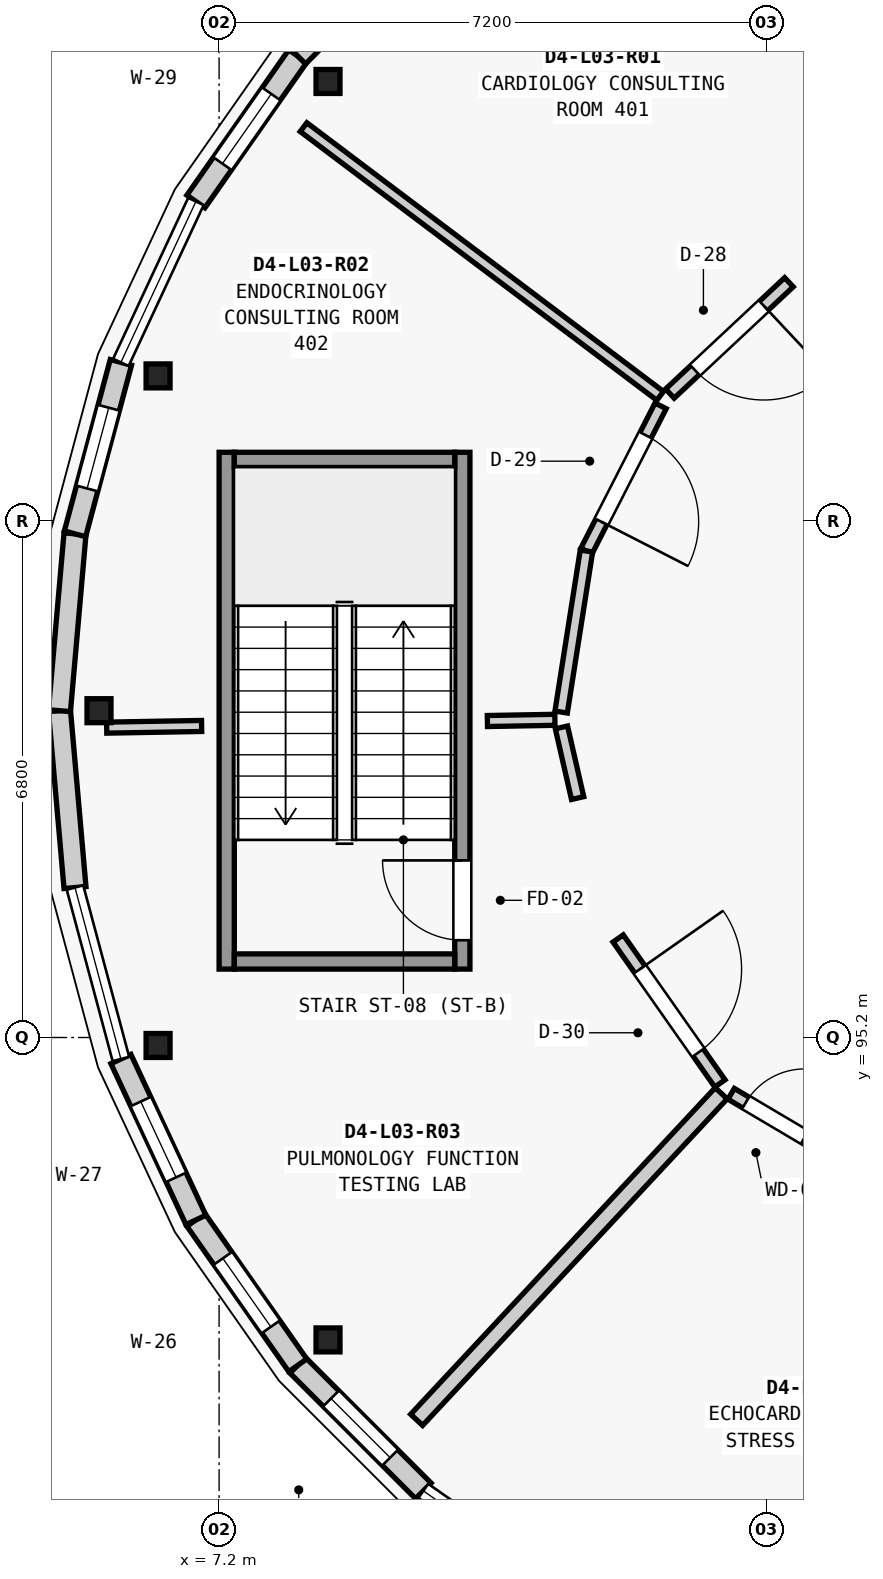
"""IFC4 building model, lengths in metres.
Left out: names, types, materials, properties, quantities, classifications, styles, units other than length and angle.
Written with IfcOpenShell. Run it as: python <this file> out.ifc"""

import sys

from ifc_helpers import new_model, si_unit, direction, frame, frame_2d, origin, origin_2d, place, context, subcontext, project, spatial, rectangle, extrude, element, fill, save


model = new_model("IFC4")
c1 = context("Model", 3, precision=1e-05, world=origin(), true_north=direction((0.0, 1.0)))
c2 = subcontext(c1, "Body", "Model", "MODEL_VIEW")
j1 = project(units=[si_unit("LENGTHUNIT", "METRE"), si_unit("PLANEANGLEUNIT", "RADIAN")], contexts=[c1])
p1 = place(None, origin())
s1 = spatial("IfcSite", under=j1, at=p1, CompositionType="ELEMENT")
p2 = place(p1, origin())
s2 = spatial("IfcBuilding", under=s1, at=p2, CompositionType="ELEMENT")
p3 = place(p2, frame((0.0, 0.0, 12.95)))
s3 = spatial("IfcBuildingStorey", under=s2, at=p3, CompositionType="ELEMENT", Elevation=12.95)
for number, where, z_axis, x_axis in (
    (1, (8.633, 107.779, 0.0), (0.0, 0.0, 1.0), (1.0, 0.0, 0.0)),
    (2, (6.397, 103.905, 0.0), (0.0, 0.0, 1.0), (1.0, 0.0, 0.0)),
    (3, (5.62, 99.5, 0.0), (0.0, 0.0, 1.0), (1.0, 0.0, 0.0)),
    (4, (6.397, 95.095, 0.0), (0.0, 0.0, 1.0), (1.0, 0.0, 0.0)),
    (5, (8.633, 91.221, 0.0), (0.0, 0.0, 1.0), (1.0, 0.0, 0.0)),
):
    element("IfcColumn", number, at=place(p3, frame(where, z_axis=z_axis, x_axis=x_axis)), inside=s3, PredefinedType="COLUMN", context=c2, shape_type="SweptSolid", body=[
        extrude(rectangle(XDim=0.315, YDim=0.315, at=origin_2d()), origin(), (0.0, 0.0, 1.0), 4.2),
    ])
p4 = place(p3, frame((9.887, 89.235, 0.0), z_axis=(0.0, 0.0, 1.0), x_axis=(-0.707106781187, 0.707106781187, 0.0)))
e6 = element("IfcWall", 6, at=p4, inside=s3, PredefinedType="ELEMENTEDWALL", context=c2, shape_type="SweptSolid", body=[
    extrude(rectangle(XDim=2.336, YDim=0.29, at=frame_2d((1.168, 0.0))), origin(), (0.0, 0.0, 1.0), 3.349),
])
p5 = place(p4, frame((0.618, 0.0, 0.85)))
e7 = element("IfcOpeningElement", 7, at=p5, cuts=e6, PredefinedType="OPENING", context=c2, shape_type="SweptSolid", body=[
    extrude(rectangle(XDim=1.1, YDim=1.25, at=frame_2d((0.55, 0.625))), frame((0.0, 0.155, 0.0), z_axis=(0.0, -1.0, 0.0), x_axis=(1.0, 0.0, 0.0)), (0.0, 0.0, 1.0), 0.31),
])
p6 = place(p3, frame((8.235, 90.887, 0.0), z_axis=(0.0, 0.0, 1.0), x_axis=(-0.573728883722, 0.819045278347, 0.0)))
e8 = element("IfcWall", 8, at=p6, inside=s3, PredefinedType="ELEMENTEDWALL", context=c2, shape_type="SweptSolid", body=[
    extrude(rectangle(XDim=2.336, YDim=0.29, at=frame_2d((1.168, 0.0))), origin(), (0.0, 0.0, 1.0), 3.349),
])
p7 = place(p6, frame((0.618, 0.0, 0.85)))
e9 = element("IfcOpeningElement", 9, at=p7, cuts=e8, PredefinedType="OPENING", context=c2, shape_type="SweptSolid", body=[
    extrude(rectangle(XDim=1.1, YDim=1.5, at=frame_2d((0.55, 0.75))), frame((0.0, 0.155, 0.0), z_axis=(0.0, -1.0, 0.0), x_axis=(1.0, 0.0, 0.0)), (0.0, 0.0, 1.0), 0.31),
])
p8 = place(p3, frame((6.895, 92.8, 0.0), z_axis=(0.0, 0.0, 1.0), x_axis=(-0.422587894318, 0.906321946979, 0.0)))
e10 = element("IfcWall", 10, at=p8, inside=s3, PredefinedType="ELEMENTEDWALL", context=c2, shape_type="SweptSolid", body=[
    extrude(rectangle(XDim=2.336, YDim=0.29, at=frame_2d((1.168, 0.0))), origin(), (0.0, 0.0, 1.0), 3.349),
])
p9 = place(p8, frame((0.618, 0.0, 0.85)))
e11 = element("IfcOpeningElement", 11, at=p9, cuts=e10, PredefinedType="OPENING", context=c2, shape_type="SweptSolid", body=[
    extrude(rectangle(XDim=1.1, YDim=1.85, at=frame_2d((0.55, 0.925))), frame((0.0, 0.155, 0.0), z_axis=(0.0, -1.0, 0.0), x_axis=(1.0, 0.0, 0.0)), (0.0, 0.0, 1.0), 0.31),
])
for number, where, z_axis, x_axis in (
    (12, (5.304, 97.173, 0.0), (0.0, 0.0, 1.0), (-0.087, 0.996, 0.0)),
    (13, (5.1, 99.5, 0.0), (0.0, 0.0, 1.0), (0.087, 0.996, 0.0)),
):
    element("IfcWall", number, at=place(p3, frame(where, z_axis=z_axis, x_axis=x_axis)), inside=s3, PredefinedType="ELEMENTEDWALL", context=c2, shape_type="SweptSolid", body=[
        extrude(rectangle(XDim=2.336, YDim=0.29, at=frame_2d((1.168, 0.0))), origin(), (0.0, 0.0, 1.0), 3.349),
    ])
p10 = place(p3, frame((5.304, 101.827, 0.0), z_axis=(0.0, 0.0, 1.0), x_axis=(0.258612423585, 0.965981166673, 0.0)))
e14 = element("IfcWall", 14, at=p10, inside=s3, PredefinedType="ELEMENTEDWALL", context=c2, shape_type="SweptSolid", body=[
    extrude(rectangle(XDim=2.335, YDim=0.29, at=frame_2d((1.168, 0.0))), origin(), (0.0, 0.0, 1.0), 3.349),
])
p11 = place(p10, frame((0.618, 0.0, 0.85)))
e15 = element("IfcOpeningElement", 15, at=p11, cuts=e14, PredefinedType="OPENING", context=c2, shape_type="SweptSolid", body=[
    extrude(rectangle(XDim=1.1, YDim=2.1, at=frame_2d((0.55, 1.05))), frame((0.0, 0.155, 0.0), z_axis=(0.0, -1.0, 0.0), x_axis=(1.0, 0.0, 0.0)), (0.0, 0.0, 1.0), 0.31),
])
p12 = place(p3, frame((6.895, 106.2, 0.0), z_axis=(0.0, 0.0, 1.0), x_axis=(0.573728883722, 0.819045278347, 0.0)))
e16 = element("IfcWall", 16, at=p12, inside=s3, PredefinedType="ELEMENTEDWALL", context=c2, shape_type="SweptSolid", body=[
    extrude(rectangle(XDim=2.336, YDim=0.29, at=frame_2d((1.168, 0.0))), origin(), (0.0, 0.0, 1.0), 3.349),
])
p13 = place(p12, frame((0.608, 0.0, 0.85)))
e17 = element("IfcOpeningElement", 17, at=p13, cuts=e16, PredefinedType="OPENING", context=c2, shape_type="SweptSolid", body=[
    extrude(rectangle(XDim=1.12, YDim=1.65, at=frame_2d((0.56, 0.825))), frame((0.0, 0.155, 0.0), z_axis=(0.0, -1.0, 0.0), x_axis=(1.0, 0.0, 0.0)), (0.0, 0.0, 1.0), 0.31),
])
p14 = place(p3, frame((8.235, 108.113, 0.0), z_axis=(0.0, 0.0, 1.0), x_axis=(0.707106781187, 0.707106781187, 0.0)))
e18 = element("IfcWall", 18, at=p14, inside=s3, PredefinedType="ELEMENTEDWALL", context=c2, shape_type="SweptSolid", body=[
    extrude(rectangle(XDim=2.336, YDim=0.29, at=frame_2d((1.168, 0.0))), origin(), (0.0, 0.0, 1.0), 3.349),
])
p15 = place(p14, frame((0.593, 0.0, 0.85)))
e19 = element("IfcOpeningElement", 19, at=p15, cuts=e18, PredefinedType="OPENING", context=c2, shape_type="SweptSolid", body=[
    extrude(rectangle(XDim=1.15, YDim=1.4, at=frame_2d((0.575, 0.7))), frame((0.0, 0.155, 0.0), z_axis=(0.0, -1.0, 0.0), x_axis=(1.0, 0.0, 0.0)), (0.0, 0.0, 1.0), 0.31),
])
p16 = place(p3, frame((10.4, 96.1, 0.0), z_axis=(0.0, 0.0, 1.0), x_axis=(0.0, 1.0, 0.0)))
e20 = element("IfcWall", 20, at=p16, inside=s3, PredefinedType="SHEAR", context=c2, shape_type="SweptSolid", body=[
    extrude(rectangle(XDim=6.8, YDim=0.2, at=frame_2d((3.4, 0.0))), origin(), (0.0, 0.0, 1.0), 3.995),
])
p17 = place(p16, frame((0.38, 0.0, 0.0)))
e21 = element("IfcOpeningElement", 21, at=p17, cuts=e20, PredefinedType="OPENING", context=c2, shape_type="SweptSolid", body=[
    extrude(rectangle(XDim=1.05, YDim=2.15, at=frame_2d((0.525, 1.075))), frame((0.0, 0.11, 0.0), z_axis=(0.0, -1.0, 0.0), x_axis=(1.0, 0.0, 0.0)), (0.0, 0.0, 1.0), 0.22),
])
p18 = place(p3, frame((7.3, 96.1, 0.0), z_axis=(0.0, 0.0, 1.0), x_axis=(0.0, 1.0, 0.0)))
e22 = element("IfcWall", 22, at=p18, inside=s3, PredefinedType="SHEAR", context=c2, shape_type="SweptSolid", body=[
    extrude(rectangle(XDim=6.8, YDim=0.2, at=frame_2d((3.4, 0.0))), origin(), (0.0, 0.0, 1.0), 3.995),
])
for number, where, z_axis, x_axis in (
    (23, (10.3, 96.2, 0.0), (0.0, 0.0, 1.0), (-1.0, 0.0, 0.0)),
    (24, (10.3, 102.8, 0.0), (0.0, 0.0, 1.0), (-1.0, 0.0, 0.0)),
):
    element("IfcWall", number, at=place(p3, frame(where, z_axis=z_axis, x_axis=x_axis)), inside=s3, PredefinedType="SHEAR", context=c2, shape_type="SweptSolid", body=[
        extrude(rectangle(XDim=2.9, YDim=0.2, at=frame_2d((1.45, 0.0))), origin(), (0.0, 0.0, 1.0), 3.995),
    ])
p19 = place(p3, frame((13.003, 103.642, 0.0), z_axis=(0.0, 0.0, 1.0), x_axis=(-0.798611576701, 0.601846782462, 0.0)))
e25 = element("IfcWall", 25, at=p19, inside=s3, PredefinedType="PARTITIONING", context=c2, shape_type="SweptSolid", body=[
    extrude(rectangle(XDim=5.875, YDim=0.145, at=frame_2d((2.938, 0.0))), origin(), (0.0, 0.0, 1.0), 3.324),
])
p20 = place(p3, frame((11.618, 99.38, 0.0), z_axis=(0.0, 0.0, 1.0), x_axis=(-0.999840336335, -0.017869018934, 0.0)))
e26 = element("IfcWall", 26, at=p20, inside=s3, PredefinedType="PARTITIONING", context=c2, shape_type="SweptSolid", body=[
    extrude(rectangle(XDim=0.888, YDim=0.145, at=frame_2d((0.444, 0.0))), origin(), (0.0, 0.0, 1.0), 3.324),
])
p21 = place(p3, frame((6.97, 99.299, 0.0), z_axis=(0.0, 0.0, 1.0), x_axis=(-0.999845298985, -0.017589147167, 0.0)))
e27 = element("IfcWall", 27, at=p21, inside=s3, PredefinedType="PARTITIONING", context=c2, shape_type="SweptSolid", body=[
    extrude(rectangle(XDim=1.249, YDim=0.145, at=frame_2d((0.625, 0.0))), origin(), (0.0, 0.0, 1.0), 3.324),
])
p22 = place(p3, frame((13.806, 94.466, 0.0), z_axis=(0.0, 0.0, 1.0), x_axis=(-0.681971732264, -0.731378531537, 0.0)))
e28 = element("IfcWall", 28, at=p22, inside=s3, PredefinedType="SOLIDWALL", context=c2, shape_type="SweptSolid", body=[
    extrude(rectangle(XDim=5.875, YDim=0.215, at=frame_2d((2.938, 0.0))), origin(), (0.0, 0.0, 1.0), 3.324),
])
p23 = place(p3, frame((14.697, 105.137, 0.0), z_axis=(0.0, 0.0, 1.0), x_axis=(-0.73028240744, -0.683145376464, 0.0)))
e29 = element("IfcWall", 29, at=p23, inside=s3, PredefinedType="PARTITIONING", context=c2, shape_type="SweptSolid", body=[
    extrude(rectangle(XDim=2.144, YDim=0.165, at=frame_2d((1.072, 0.0))), origin(), (0.0, 0.0, 1.0), 3.324),
])
p24 = place(p23, frame((0.453, 0.0, 0.0)))
e30 = element("IfcOpeningElement", 30, at=p24, cuts=e29, PredefinedType="OPENING", context=c2, shape_type="SweptSolid", body=[
    extrude(rectangle(XDim=1.24, YDim=2.22, at=frame_2d((0.62, 1.11))), frame((0.0, 0.093, 0.0), z_axis=(0.0, -1.0, 0.0), x_axis=(1.0, 0.0, 0.0)), (0.0, 0.0, 1.0), 0.185),
])
p25 = place(p3, frame((13.009, 103.511, 0.0), z_axis=(0.0, 0.0, 1.0), x_axis=(-0.455072954242, -0.890454157337, 0.0)))
e31 = element("IfcWall", 31, at=p25, inside=s3, PredefinedType="PARTITIONING", context=c2, shape_type="SweptSolid", body=[
    extrude(rectangle(XDim=2.145, YDim=0.165, at=frame_2d((1.072, 0.0))), origin(), (0.0, 0.0, 1.0), 3.324),
])
p26 = place(p25, frame((0.433, 0.0, 0.0)))
e32 = element("IfcOpeningElement", 32, at=p26, cuts=e31, PredefinedType="OPENING", context=c2, shape_type="SweptSolid", body=[
    extrude(rectangle(XDim=1.28, YDim=2.3, at=frame_2d((0.64, 1.15))), frame((0.0, 0.093, 0.0), z_axis=(0.0, -1.0, 0.0), x_axis=(1.0, 0.0, 0.0)), (0.0, 0.0, 1.0), 0.185),
])
p27 = place(p3, frame((12.033, 101.601, 0.0), z_axis=(0.0, 0.0, 1.0), x_axis=(-0.155237833992, -0.987877125404, 0.0)))
e33 = element("IfcWall", 33, at=p27, inside=s3, PredefinedType="PARTITIONING", context=c2, shape_type="SweptSolid", body=[
    extrude(rectangle(XDim=2.145, YDim=0.165, at=frame_2d((1.073, 0.0))), origin(), (0.0, 0.0, 1.0), 3.324),
])
p28 = place(p3, frame((11.704, 99.28, 0.0), z_axis=(0.0, 0.0, 1.0), x_axis=(0.223158332348, -0.974782210909, 0.0)))
e34 = element("IfcWall", 34, at=p28, inside=s3, PredefinedType="PARTITIONING", context=c2, shape_type="SweptSolid", body=[
    extrude(rectangle(XDim=0.954, YDim=0.165, at=frame_2d((0.477, 0.0))), origin(), (0.0, 0.0, 1.0), 3.324),
])
p29 = place(p3, frame((12.45, 96.503, 0.0), z_axis=(0.0, 0.0, 1.0), x_axis=(0.574678200401, -0.818379475539, 0.0)))
e35 = element("IfcWall", 35, at=p29, inside=s3, PredefinedType="PARTITIONING", context=c2, shape_type="SweptSolid", body=[
    extrude(rectangle(XDim=2.33, YDim=0.165, at=frame_2d((1.165, 0.0))), origin(), (0.0, 0.0, 1.0), 3.324),
])
p30 = place(p29, frame((0.495, 0.0, 0.0)))
e36 = element("IfcOpeningElement", 36, at=p30, cuts=e35, PredefinedType="OPENING", context=c2, shape_type="SweptSolid", body=[
    extrude(rectangle(XDim=1.34, YDim=2.32, at=frame_2d((0.67, 1.16))), frame((0.0, 0.093, 0.0), z_axis=(0.0, -1.0, 0.0), x_axis=(1.0, 0.0, 0.0)), (0.0, 0.0, 1.0), 0.185),
])
p31 = place(p3, frame((13.937, 94.459, 0.0), z_axis=(0.0, 0.0, 1.0), x_axis=(0.860532897503, -0.509394868756, 0.0)))
e37 = element("IfcWall", 37, at=p31, inside=s3, PredefinedType="PARTITIONING", context=c2, shape_type="SweptSolid", body=[
    extrude(rectangle(XDim=1.347, YDim=0.165, at=frame_2d((0.673, 0.0))), origin(), (0.0, 0.0, 1.0), 3.324),
])
p32 = place(p31, frame((0.224, 0.0, 0.0)))
e38 = element("IfcOpeningElement", 38, at=p32, cuts=e37, PredefinedType="OPENING", context=c2, shape_type="SweptSolid", body=[
    extrude(rectangle(XDim=0.9, YDim=2.1, at=frame_2d((0.45, 1.05))), frame((0.0, 0.093, 0.0), z_axis=(0.0, -1.0, 0.0), x_axis=(1.0, 0.0, 0.0)), (0.0, 0.0, 1.0), 0.185),
])
p33 = place(p5, origin())
e39 = element("IfcWindow", 39, at=p33, inside=s3, PartitioningType="SINGLE_PANEL", PredefinedType="WINDOW", context=c2, shape_type="SweptSolid", body=[
    extrude(rectangle(XDim=1.1, YDim=1.25, at=frame_2d((0.55, 0.625))), frame((0.0, 0.03, 0.0), z_axis=(0.0, -1.0, 0.0), x_axis=(1.0, 0.0, 0.0)), (0.0, 0.0, 1.0), 0.06),
])
fill(e7, e39)
p34 = place(p7, origin())
e40 = element("IfcWindow", 40, at=p34, inside=s3, PartitioningType="SINGLE_PANEL", PredefinedType="WINDOW", context=c2, shape_type="SweptSolid", body=[
    extrude(rectangle(XDim=1.1, YDim=1.5, at=frame_2d((0.55, 0.75))), frame((0.0, 0.03, 0.0), z_axis=(0.0, -1.0, 0.0), x_axis=(1.0, 0.0, 0.0)), (0.0, 0.0, 1.0), 0.06),
])
fill(e9, e40)
p35 = place(p9, origin())
e41 = element("IfcWindow", 41, at=p35, inside=s3, PartitioningType="SINGLE_PANEL", PredefinedType="WINDOW", context=c2, shape_type="SweptSolid", body=[
    extrude(rectangle(XDim=1.1, YDim=1.85, at=frame_2d((0.55, 0.925))), frame((0.0, 0.03, 0.0), z_axis=(0.0, -1.0, 0.0), x_axis=(1.0, 0.0, 0.0)), (0.0, 0.0, 1.0), 0.06),
])
fill(e11, e41)
p36 = place(p11, origin())
e42 = element("IfcWindow", 42, at=p36, inside=s3, PartitioningType="SINGLE_PANEL", PredefinedType="WINDOW", context=c2, shape_type="SweptSolid", body=[
    extrude(rectangle(XDim=1.1, YDim=2.1, at=frame_2d((0.55, 1.05))), frame((0.0, 0.03, 0.0), z_axis=(0.0, -1.0, 0.0), x_axis=(1.0, 0.0, 0.0)), (0.0, 0.0, 1.0), 0.06),
])
fill(e15, e42)
p37 = place(p13, origin())
e43 = element("IfcWindow", 43, at=p37, inside=s3, PartitioningType="SINGLE_PANEL", PredefinedType="WINDOW", context=c2, shape_type="SweptSolid", body=[
    extrude(rectangle(XDim=1.12, YDim=1.65, at=frame_2d((0.56, 0.825))), frame((0.0, 0.03, 0.0), z_axis=(0.0, -1.0, 0.0), x_axis=(1.0, 0.0, 0.0)), (0.0, 0.0, 1.0), 0.06),
])
fill(e17, e43)
p38 = place(p17, origin())
e44 = element("IfcDoor", 44, at=p38, inside=s3, OperationType="SINGLE_SWING_RIGHT", PredefinedType="DOOR", context=c2, shape_type="SweptSolid", body=[
    extrude(rectangle(XDim=1.05, YDim=2.15, at=frame_2d((0.525, 1.075))), frame((0.0, 0.025, 0.0), z_axis=(0.0, -1.0, 0.0), x_axis=(1.0, 0.0, 0.0)), (0.0, 0.0, 1.0), 0.05),
])
fill(e21, e44)
p39 = place(p24, origin())
e45 = element("IfcDoor", 45, at=p39, inside=s3, OperationType="SINGLE_SWING_LEFT", PredefinedType="DOOR", context=c2, shape_type="SweptSolid", body=[
    extrude(rectangle(XDim=1.24, YDim=2.22, at=frame_2d((0.62, 1.11))), frame((0.0, 0.025, 0.0), z_axis=(0.0, -1.0, 0.0), x_axis=(1.0, 0.0, 0.0)), (0.0, 0.0, 1.0), 0.05),
])
fill(e30, e45)
p40 = place(p26, origin())
e46 = element("IfcDoor", 46, at=p40, inside=s3, OperationType="SINGLE_SWING_RIGHT", PredefinedType="DOOR", context=c2, shape_type="SweptSolid", body=[
    extrude(rectangle(XDim=1.28, YDim=2.3, at=frame_2d((0.64, 1.15))), frame((0.0, 0.025, 0.0), z_axis=(0.0, -1.0, 0.0), x_axis=(1.0, 0.0, 0.0)), (0.0, 0.0, 1.0), 0.05),
])
fill(e32, e46)
p41 = place(p30, origin())
e47 = element("IfcDoor", 47, at=p41, inside=s3, OperationType="SINGLE_SWING_LEFT", PredefinedType="DOOR", context=c2, shape_type="SweptSolid", body=[
    extrude(rectangle(XDim=1.34, YDim=2.32, at=frame_2d((0.67, 1.16))), frame((0.0, 0.025, 0.0), z_axis=(0.0, -1.0, 0.0), x_axis=(1.0, 0.0, 0.0)), (0.0, 0.0, 1.0), 0.05),
])
fill(e36, e47)
p42 = place(p32, origin())
e48 = element("IfcDoor", 48, at=p42, inside=s3, OperationType="SINGLE_SWING_RIGHT", PredefinedType="DOOR", context=c2, shape_type="SweptSolid", body=[
    extrude(rectangle(XDim=0.9, YDim=2.1, at=frame_2d((0.45, 1.05))), frame((0.0, 0.025, 0.0), z_axis=(0.0, -1.0, 0.0), x_axis=(1.0, 0.0, 0.0)), (0.0, 0.0, 1.0), 0.05),
])
fill(e38, e48)
save(model, sys.argv[1])
